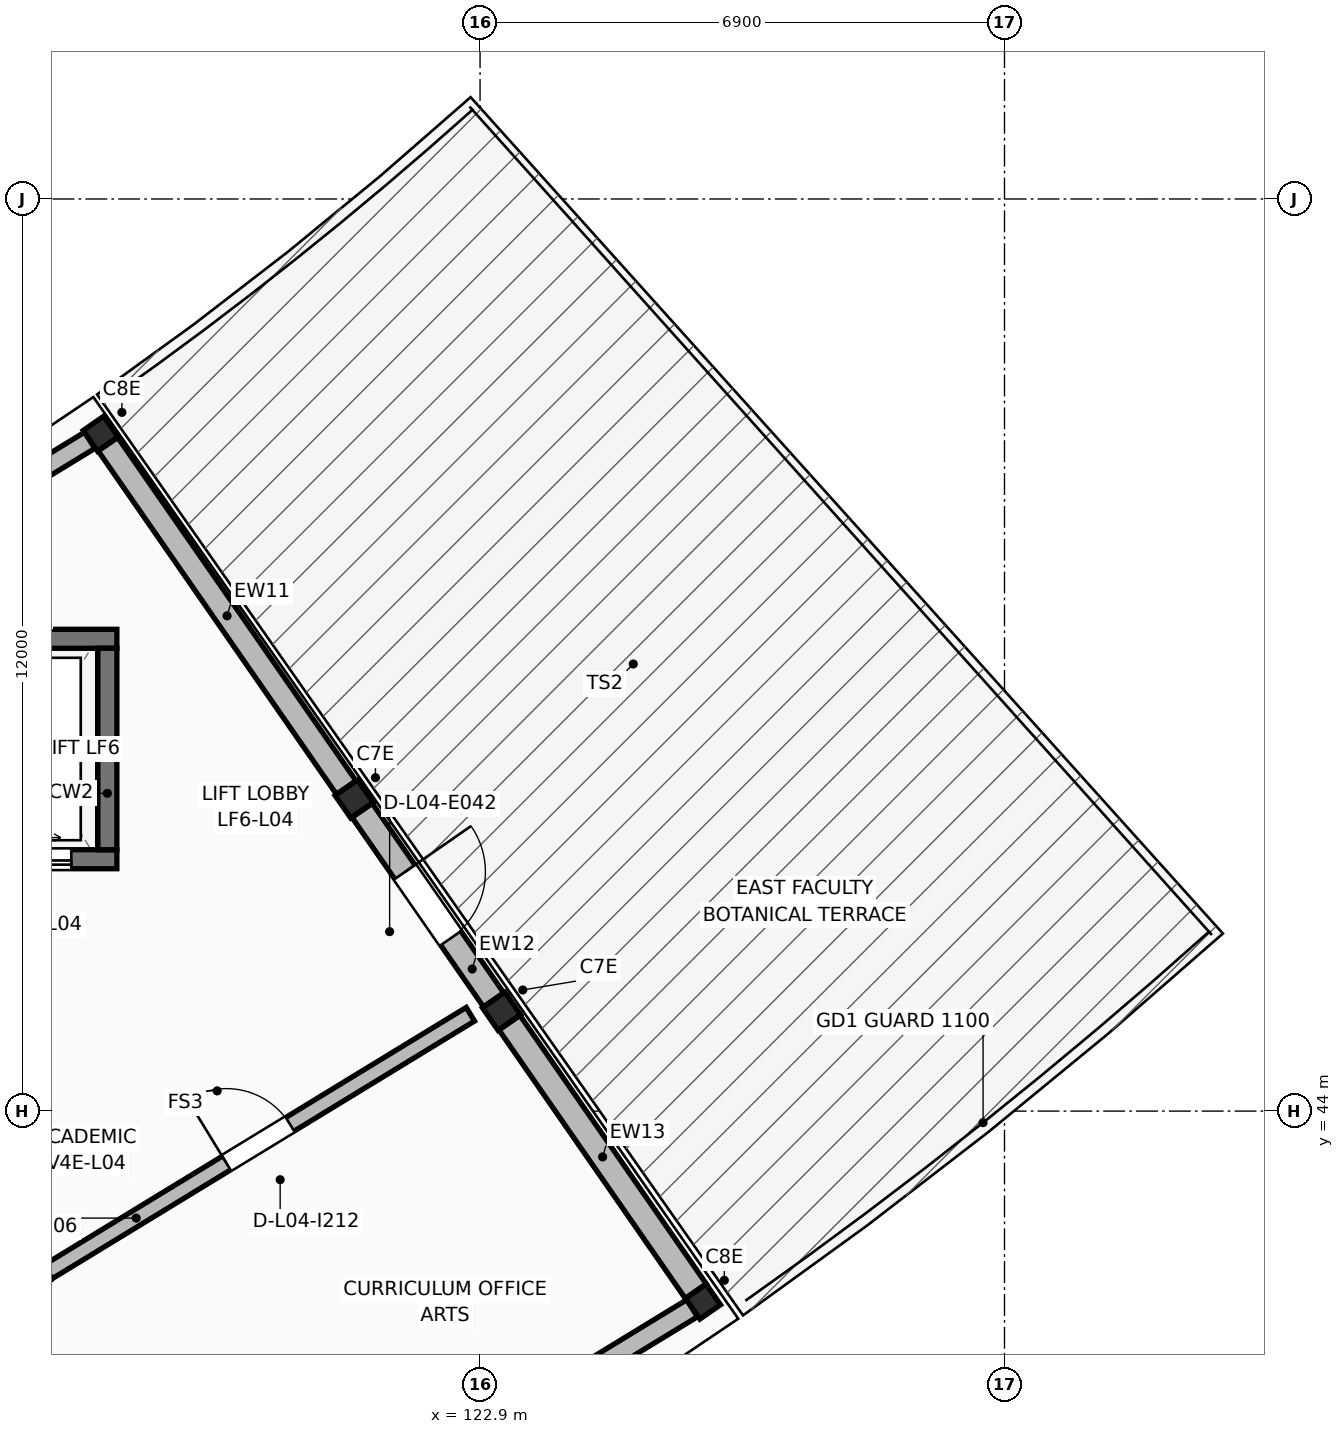
"""IFC4 building model, lengths in metres.
Left out: names, types, materials, properties, quantities, classifications, styles, units other than length and angle.
Written with IfcOpenShell. Run it as: python <this file> out.ifc"""

import sys

from ifc_helpers import new_model, si_unit, direction, frame, frame_2d, origin, origin_2d, place, context, subcontext, project, spatial, rectangle, extrude, element, fill, save


model = new_model("IFC4")
c1 = context("Model", 3, precision=1e-05, world=origin(), true_north=direction((0.0, 1.0)))
c2 = subcontext(c1, "Body", "Model", "MODEL_VIEW")
j1 = project(units=[si_unit("LENGTHUNIT", "METRE"), si_unit("PLANEANGLEUNIT", "RADIAN")], contexts=[c1])
p1 = place(None, origin())
s1 = spatial("IfcSite", under=j1, at=p1, CompositionType="ELEMENT")
p2 = place(p1, origin())
s2 = spatial("IfcBuilding", under=s1, at=p2, CompositionType="ELEMENT")
p3 = place(p2, frame((0.0, 0.0, 15.64)))
s3 = spatial("IfcBuildingStorey", under=s2, at=p3, CompositionType="ELEMENT", Elevation=15.64)
p4 = place(p3, frame((117.908, 52.913, 0.0), z_axis=(0.0, 0.0, 1.0), x_axis=(0.570283536751, -0.821447921484, 0.0)))
e1 = element("IfcColumn", 1, at=p4, inside=s3, PredefinedType="COLUMN", context=c2, shape_type="SweptSolid", body=[
    extrude(rectangle(XDim=0.33, YDim=0.33, at=origin_2d()), origin(), (0.0, 0.0, 1.0), 3.74),
])
for number, where, z_axis, x_axis in (
    (2, (121.243, 48.107, 0.0), (0.0, 0.0, 1.0), (0.57, -0.821, 0.0)),
    (3, (123.182, 45.314, 0.0), (0.0, 0.0, 1.0), (0.57, -0.821, 0.0)),
):
    element("IfcColumn", number, at=place(p3, frame(where, z_axis=z_axis, x_axis=x_axis)), inside=s3, PredefinedType="COLUMN", context=c2, shape_type="SweptSolid", body=[
        extrude(rectangle(XDim=0.36, YDim=0.36, at=origin_2d()), origin(), (0.0, 0.0, 1.0), 3.74),
    ])
p5 = place(p3, frame((125.834, 41.494, 0.0), z_axis=(0.0, 0.0, 1.0), x_axis=(0.570283536751, -0.821447921484, 0.0)))
e4 = element("IfcColumn", 4, at=p5, inside=s3, PredefinedType="COLUMN", context=c2, shape_type="SweptSolid", body=[
    extrude(rectangle(XDim=0.33, YDim=0.33, at=origin_2d()), origin(), (0.0, 0.0, 1.0), 3.74),
])
p6 = place(p3, frame((115.771, 50.214, 0.0), z_axis=(0.0, 0.0, 1.0), x_axis=(1.0, 0.0, 0.0)))
e5 = element("IfcWall", 5, at=p6, inside=s3, PredefinedType="SHEAR", context=c2, shape_type="SweptSolid", body=[
    extrude(rectangle(XDim=2.35, YDim=0.25, at=frame_2d((1.175, 0.0))), origin(), (0.0, 0.0, 1.0), 3.53),
])
p7 = place(p3, frame((115.771, 47.314, 0.0), z_axis=(0.0, 0.0, 1.0), x_axis=(1.0, 0.0, 0.0)))
e6 = element("IfcWall", 6, at=p7, inside=s3, PredefinedType="SHEAR", context=c2, shape_type="SweptSolid", body=[
    extrude(rectangle(XDim=2.35, YDim=0.25, at=frame_2d((1.175, 0.0))), origin(), (0.0, 0.0, 1.0), 3.53),
])
p8 = place(p7, frame((0.6, 0.0, 0.0)))
e7 = element("IfcOpeningElement", 7, at=p8, cuts=e6, PredefinedType="OPENING", context=c2, shape_type="SweptSolid", body=[
    extrude(rectangle(XDim=1.15, YDim=2.15, at=frame_2d((0.575, 1.075))), frame((0.0, 0.135, 0.0), z_axis=(0.0, -1.0, 0.0), x_axis=(1.0, 0.0, 0.0)), (0.0, 0.0, 1.0), 0.27),
])
p9 = place(p3, frame((117.996, 47.439, 0.0), z_axis=(0.0, 0.0, 1.0), x_axis=(0.0, 1.0, 0.0)))
e8 = element("IfcWall", 8, at=p9, inside=s3, PredefinedType="SHEAR", context=c2, shape_type="SweptSolid", body=[
    extrude(rectangle(XDim=2.65, YDim=0.25, at=frame_2d((1.325, 0.0))), origin(), (0.0, 0.0, 1.0), 3.53),
])
p10 = place(p3, frame((112.767, 49.777, 0.0), z_axis=(0.0, 0.0, 1.0), x_axis=(0.853723820394, 0.520726068573, 0.0)))
e9 = element("IfcWall", 9, at=p10, inside=s3, PredefinedType="STANDARD", context=c2, shape_type="SweptSolid", body=[
    extrude(rectangle(XDim=5.854, YDim=0.252, at=frame_2d((2.927, 0.0))), origin(), (0.0, 0.0, 1.0), 2.82),
])
p11 = place(p10, frame((1.058, 0.0, 0.95)))
e10 = element("IfcOpeningElement", 10, at=p11, cuts=e9, PredefinedType="OPENING", context=c2, shape_type="SweptSolid", body=[
    extrude(rectangle(XDim=1.34, YDim=1.6, at=frame_2d((0.67, 0.8))), frame((0.0, 0.136, 0.0), z_axis=(0.0, -1.0, 0.0), x_axis=(1.0, 0.0, 0.0)), (0.0, 0.0, 1.0), 0.272),
])
p12 = place(p10, frame((3.456, 0.0, 0.95)))
e11 = element("IfcOpeningElement", 11, at=p12, cuts=e9, PredefinedType="OPENING", context=c2, shape_type="SweptSolid", body=[
    extrude(rectangle(XDim=1.34, YDim=1.6, at=frame_2d((0.67, 0.8))), frame((0.0, 0.136, 0.0), z_axis=(0.0, -1.0, 0.0), x_axis=(1.0, 0.0, 0.0)), (0.0, 0.0, 1.0), 0.272),
])
p13 = place(p3, frame((119.293, 37.504, 0.0), z_axis=(0.0, 0.0, 1.0), x_axis=(0.853701147524, 0.520763238638, 0.0)))
e12 = element("IfcWall", 12, at=p13, inside=s3, PredefinedType="STANDARD", context=c2, shape_type="SweptSolid", body=[
    extrude(rectangle(XDim=7.493, YDim=0.264, at=frame_2d((3.747, 0.0))), origin(), (0.0, 0.0, 1.0), 2.82),
])
p14 = place(p13, frame((1.525, 0.0, 0.95)))
e13 = element("IfcOpeningElement", 13, at=p14, cuts=e12, PredefinedType="OPENING", context=c2, shape_type="SweptSolid", body=[
    extrude(rectangle(XDim=1.46, YDim=1.15, at=frame_2d((0.73, 0.575))), frame((0.0, 0.142, 0.0), z_axis=(0.0, -1.0, 0.0), x_axis=(1.0, 0.0, 0.0)), (0.0, 0.0, 1.0), 0.284),
])
p15 = place(p13, frame((4.509, 0.0, 0.95)))
e14 = element("IfcOpeningElement", 14, at=p15, cuts=e12, PredefinedType="OPENING", context=c2, shape_type="SweptSolid", body=[
    extrude(rectangle(XDim=1.46, YDim=1.15, at=frame_2d((0.73, 0.575))), frame((0.0, 0.142, 0.0), z_axis=(0.0, -1.0, 0.0), x_axis=(1.0, 0.0, 0.0)), (0.0, 0.0, 1.0), 0.284),
])
p16 = place(p3, frame((118.003, 52.774, 0.0), z_axis=(0.0, 0.0, 1.0), x_axis=(0.570236884325, -0.821480307588, 0.0)))
e15 = element("IfcWall", 15, at=p16, inside=s3, PredefinedType="STANDARD", context=c2, shape_type="SweptSolid", body=[
    extrude(rectangle(XDim=5.499, YDim=0.312, at=frame_2d((2.75, 0.0))), origin(), (0.0, 0.0, 1.0), 2.82),
])
p17 = place(p3, frame((121.348, 47.957, 0.0), z_axis=(0.0, 0.0, 1.0), x_axis=(0.570201261131, -0.821505034559, 0.0)))
e16 = element("IfcWall", 16, at=p17, inside=s3, PredefinedType="STANDARD", context=c2, shape_type="SweptSolid", body=[
    extrude(rectangle(XDim=3.034, YDim=0.324, at=frame_2d((1.517, 0.0))), origin(), (0.0, 0.0, 1.0), 2.82),
])
p18 = place(p17, frame((0.987, 0.0, 0.0)))
e17 = element("IfcOpeningElement", 17, at=p18, cuts=e16, PredefinedType="OPENING", context=c2, shape_type="SweptSolid", body=[
    extrude(rectangle(XDim=1.06, YDim=2.18, at=frame_2d((0.53, 1.09))), frame((0.0, 0.172, 0.0), z_axis=(0.0, -1.0, 0.0), x_axis=(1.0, 0.0, 0.0)), (0.0, 0.0, 1.0), 0.344),
])
p19 = place(p3, frame((123.287, 45.163, 0.0), z_axis=(0.0, 0.0, 1.0), x_axis=(0.570237221937, -0.821480073232, 0.0)))
e18 = element("IfcWall", 18, at=p19, inside=s3, PredefinedType="STANDARD", context=c2, shape_type="SweptSolid", body=[
    extrude(rectangle(XDim=4.299, YDim=0.336, at=frame_2d((2.149, 0.0))), origin(), (0.0, 0.0, 1.0), 2.82),
])
p20 = place(p3, frame((117.189, 41.868, 0.0), z_axis=(0.0, 0.0, 1.0), x_axis=(0.853694979533, 0.520773349855, 0.0)))
e19 = element("IfcWall", 19, at=p20, inside=s3, PredefinedType="STANDARD", context=c2, shape_type="SweptSolid", body=[
    extrude(rectangle(XDim=6.54, YDim=0.21, at=frame_2d((3.27, 0.0))), origin(), (0.0, 0.0, 1.0), 2.76),
])
p21 = place(p20, frame((2.78, 0.0, 0.0)))
e20 = element("IfcOpeningElement", 20, at=p21, cuts=e19, PredefinedType="OPENING", context=c2, shape_type="SweptSolid", body=[
    extrude(rectangle(XDim=0.98, YDim=2.06, at=frame_2d((0.49, 1.03))), frame((0.0, 0.115, 0.0), z_axis=(0.0, -1.0, 0.0), x_axis=(1.0, 0.0, 0.0)), (0.0, 0.0, 1.0), 0.23),
])
p22 = place(p18, origin())
e21 = element("IfcDoor", 21, at=p22, inside=s3, OperationType="SINGLE_SWING_LEFT", PredefinedType="DOOR", context=c2, shape_type="SweptSolid", body=[
    extrude(rectangle(XDim=1.06, YDim=2.18, at=frame_2d((0.53, 1.09))), frame((0.0, 0.025, 0.0), z_axis=(0.0, -1.0, 0.0), x_axis=(1.0, 0.0, 0.0)), (0.0, 0.0, 1.0), 0.05),
])
fill(e17, e21)
p23 = place(p8, origin())
e22 = element("IfcDoor", 22, at=p23, inside=s3, OperationType="DOUBLE_DOOR_SLIDING", PredefinedType="DOOR", context=c2, shape_type="SweptSolid", body=[
    extrude(rectangle(XDim=1.15, YDim=2.15, at=frame_2d((0.575, 1.075))), frame((0.0, 0.025, 0.0), z_axis=(0.0, -1.0, 0.0), x_axis=(1.0, 0.0, 0.0)), (0.0, 0.0, 1.0), 0.05),
])
fill(e7, e22)
p24 = place(p21, origin())
e23 = element("IfcDoor", 23, at=p24, inside=s3, OperationType="SINGLE_SWING_LEFT", PredefinedType="DOOR", context=c2, shape_type="SweptSolid", body=[
    extrude(rectangle(XDim=0.98, YDim=2.06, at=frame_2d((0.49, 1.03))), frame((0.0, 0.025, 0.0), z_axis=(0.0, -1.0, 0.0), x_axis=(1.0, 0.0, 0.0)), (0.0, 0.0, 1.0), 0.05),
])
fill(e20, e23)
save(model, sys.argv[1])
